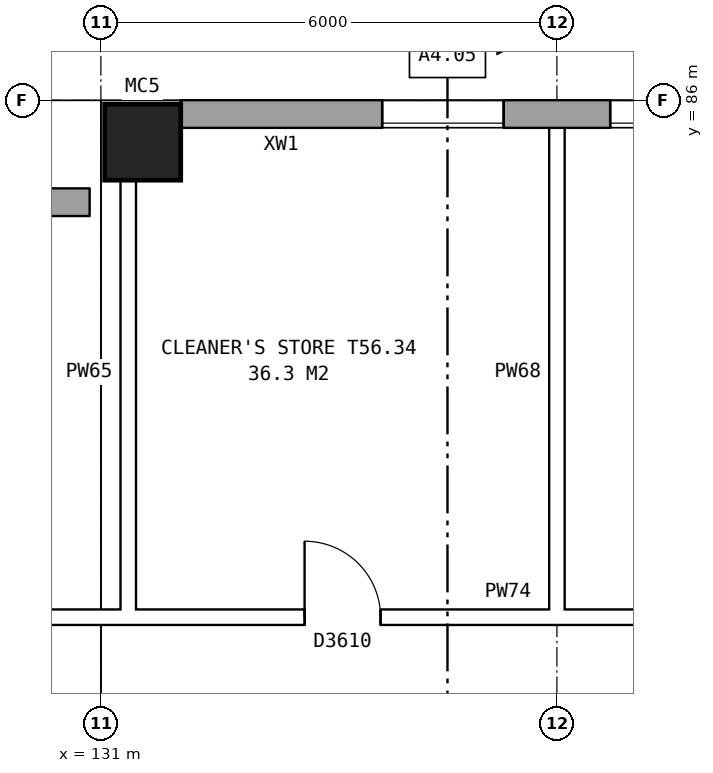
"""IFC4 building model, lengths in metres.
Left out: names, types, materials, properties, quantities, classifications, styles, units other than length and angle.
Written with IfcOpenShell. Run it as: python <this file> out.ifc"""

import sys

from ifc_helpers import new_model, si_unit, direction, frame, frame_2d, origin, origin_2d, place, context, subcontext, project, spatial, rectangle, hollow_rectangle, extrude, element, fill, save


model = new_model("IFC4")
c1 = context("Model", 3, precision=1e-05, world=origin(), true_north=direction((0.0, 1.0)))
c2 = subcontext(c1, "Body", "Model", "MODEL_VIEW")
j1 = project(units=[si_unit("LENGTHUNIT", "METRE"), si_unit("PLANEANGLEUNIT", "RADIAN")], contexts=[c1])
p1 = place(None, origin())
s1 = spatial("IfcSite", under=j1, at=p1, CompositionType="ELEMENT")
p2 = place(p1, origin())
s2 = spatial("IfcBuilding", under=s1, at=p2, CompositionType="ELEMENT")
p3 = place(p2, frame((0.0, 0.0, 198.6)))
s3 = spatial("IfcBuildingStorey", under=s2, at=p3, CompositionType="ELEMENT", Elevation=198.6)
p4 = place(p3, frame((131.55, 85.45, 0.0), z_axis=(0.0, 0.0, 1.0), x_axis=(1.0, 0.0, 0.0)))
e1 = element("IfcColumn", 1, at=p4, inside=s3, PredefinedType="COLUMN", context=c2, shape_type="SweptSolid", body=[
    extrude(hollow_rectangle(XDim=1.0, YDim=1.0, WallThickness=0.055, at=origin_2d()), origin(), (0.0, 0.0, 1.0), 4.2),
])
p5 = place(p3, frame((165.925, 85.82, 0.0), z_axis=(0.0, 0.0, 1.0), x_axis=(-1.0, 0.0, 0.0)))
e2 = element("IfcWall", 2, at=p5, inside=s3, PredefinedType="STANDARD", context=c2, shape_type="SweptSolid", body=[
    extrude(rectangle(XDim=33.875, YDim=0.36, at=frame_2d((16.938, 0.0))), origin(), (0.0, 0.0, 1.0), 3.7),
])
p6 = place(p5, frame((2.625, 0.0, 1.5)))
e3 = element("IfcOpeningElement", 3, at=p6, cuts=e2, PredefinedType="OPENING", context=c2, shape_type="SweptSolid", body=[
    extrude(rectangle(XDim=1.6, YDim=1.2, at=frame_2d((0.8, 0.6))), frame((0.0, 0.19, 0.0), z_axis=(0.0, -1.0, 0.0), x_axis=(1.0, 0.0, 0.0)), (0.0, 0.0, 1.0), 0.38),
])
p7 = place(p5, frame((5.625, 0.0, 1.5)))
e4 = element("IfcOpeningElement", 4, at=p7, cuts=e2, PredefinedType="OPENING", context=c2, shape_type="SweptSolid", body=[
    extrude(rectangle(XDim=1.6, YDim=1.2, at=frame_2d((0.8, 0.6))), frame((0.0, 0.19, 0.0), z_axis=(0.0, -1.0, 0.0), x_axis=(1.0, 0.0, 0.0)), (0.0, 0.0, 1.0), 0.38),
])
p8 = place(p5, frame((8.625, 0.0, 1.5)))
e5 = element("IfcOpeningElement", 5, at=p8, cuts=e2, PredefinedType="OPENING", context=c2, shape_type="SweptSolid", body=[
    extrude(rectangle(XDim=1.6, YDim=1.2, at=frame_2d((0.8, 0.6))), frame((0.0, 0.19, 0.0), z_axis=(0.0, -1.0, 0.0), x_axis=(1.0, 0.0, 0.0)), (0.0, 0.0, 1.0), 0.38),
])
p9 = place(p5, frame((11.625, 0.0, 1.5)))
e6 = element("IfcOpeningElement", 6, at=p9, cuts=e2, PredefinedType="OPENING", context=c2, shape_type="SweptSolid", body=[
    extrude(rectangle(XDim=1.6, YDim=1.2, at=frame_2d((0.8, 0.6))), frame((0.0, 0.19, 0.0), z_axis=(0.0, -1.0, 0.0), x_axis=(1.0, 0.0, 0.0)), (0.0, 0.0, 1.0), 0.38),
])
p10 = place(p5, frame((14.625, 0.0, 1.5)))
e7 = element("IfcOpeningElement", 7, at=p10, cuts=e2, PredefinedType="OPENING", context=c2, shape_type="SweptSolid", body=[
    extrude(rectangle(XDim=1.6, YDim=1.2, at=frame_2d((0.8, 0.6))), frame((0.0, 0.19, 0.0), z_axis=(0.0, -1.0, 0.0), x_axis=(1.0, 0.0, 0.0)), (0.0, 0.0, 1.0), 0.38),
])
p11 = place(p5, frame((17.625, 0.0, 1.5)))
e8 = element("IfcOpeningElement", 8, at=p11, cuts=e2, PredefinedType="OPENING", context=c2, shape_type="SweptSolid", body=[
    extrude(rectangle(XDim=1.6, YDim=1.2, at=frame_2d((0.8, 0.6))), frame((0.0, 0.19, 0.0), z_axis=(0.0, -1.0, 0.0), x_axis=(1.0, 0.0, 0.0)), (0.0, 0.0, 1.0), 0.38),
])
p12 = place(p5, frame((20.625, 0.0, 1.5)))
e9 = element("IfcOpeningElement", 9, at=p12, cuts=e2, PredefinedType="OPENING", context=c2, shape_type="SweptSolid", body=[
    extrude(rectangle(XDim=1.6, YDim=1.2, at=frame_2d((0.8, 0.6))), frame((0.0, 0.19, 0.0), z_axis=(0.0, -1.0, 0.0), x_axis=(1.0, 0.0, 0.0)), (0.0, 0.0, 1.0), 0.38),
])
p13 = place(p5, frame((23.625, 0.0, 1.5)))
e10 = element("IfcOpeningElement", 10, at=p13, cuts=e2, PredefinedType="OPENING", context=c2, shape_type="SweptSolid", body=[
    extrude(rectangle(XDim=1.6, YDim=1.2, at=frame_2d((0.8, 0.6))), frame((0.0, 0.19, 0.0), z_axis=(0.0, -1.0, 0.0), x_axis=(1.0, 0.0, 0.0)), (0.0, 0.0, 1.0), 0.38),
])
p14 = place(p5, frame((26.625, 0.0, 1.5)))
e11 = element("IfcOpeningElement", 11, at=p14, cuts=e2, PredefinedType="OPENING", context=c2, shape_type="SweptSolid", body=[
    extrude(rectangle(XDim=1.6, YDim=1.2, at=frame_2d((0.8, 0.6))), frame((0.0, 0.19, 0.0), z_axis=(0.0, -1.0, 0.0), x_axis=(1.0, 0.0, 0.0)), (0.0, 0.0, 1.0), 0.38),
])
p15 = place(p5, frame((29.625, 0.0, 1.5)))
e12 = element("IfcOpeningElement", 12, at=p15, cuts=e2, PredefinedType="OPENING", context=c2, shape_type="SweptSolid", body=[
    extrude(rectangle(XDim=1.6, YDim=1.2, at=frame_2d((0.8, 0.6))), frame((0.0, 0.19, 0.0), z_axis=(0.0, -1.0, 0.0), x_axis=(1.0, 0.0, 0.0)), (0.0, 0.0, 1.0), 0.38),
])
p16 = place(p3, frame((130.85, 84.66, 0.0), z_axis=(0.0, 0.0, 1.0), x_axis=(-1.0, 0.0, 0.0)))
e13 = element("IfcWall", 13, at=p16, inside=s3, PredefinedType="STANDARD", context=c2, shape_type="SweptSolid", body=[
    extrude(rectangle(XDim=54.7, YDim=0.36, at=frame_2d((27.35, 0.0))), origin(), (0.0, 0.0, 1.0), 3.7),
])
p17 = place(p16, frame((1.75, 0.0, 1.5)))
e14 = element("IfcOpeningElement", 14, at=p17, cuts=e13, PredefinedType="OPENING", context=c2, shape_type="SweptSolid", body=[
    extrude(rectangle(XDim=0.6, YDim=1.2, at=frame_2d((0.3, 0.6))), frame((0.0, 0.19, 0.0), z_axis=(0.0, -1.0, 0.0), x_axis=(1.0, 0.0, 0.0)), (0.0, 0.0, 1.0), 0.38),
])
p18 = place(p16, frame((4.206, 0.0, 1.5)))
e15 = element("IfcOpeningElement", 15, at=p18, cuts=e13, PredefinedType="OPENING", context=c2, shape_type="SweptSolid", body=[
    extrude(rectangle(XDim=1.6, YDim=1.2, at=frame_2d((0.8, 0.6))), frame((0.0, 0.19, 0.0), z_axis=(0.0, -1.0, 0.0), x_axis=(1.0, 0.0, 0.0)), (0.0, 0.0, 1.0), 0.38),
])
p19 = place(p16, frame((2.65, 0.0, 1.5)))
e16 = element("IfcOpeningElement", 16, at=p19, cuts=e13, PredefinedType="OPENING", context=c2, shape_type="SweptSolid", body=[
    extrude(rectangle(XDim=1.2, YDim=1.2, at=frame_2d((0.6, 0.6))), frame((0.0, 0.19, 0.0), z_axis=(0.0, -1.0, 0.0), x_axis=(1.0, 0.0, 0.0)), (0.0, 0.0, 1.0), 0.38),
])
p20 = place(p16, frame((11.081, 0.0, 1.5)))
e17 = element("IfcOpeningElement", 17, at=p20, cuts=e13, PredefinedType="OPENING", context=c2, shape_type="SweptSolid", body=[
    extrude(rectangle(XDim=1.6, YDim=1.2, at=frame_2d((0.8, 0.6))), frame((0.0, 0.19, 0.0), z_axis=(0.0, -1.0, 0.0), x_axis=(1.0, 0.0, 0.0)), (0.0, 0.0, 1.0), 0.38),
])
p21 = place(p16, frame((15.5, 0.0, 1.5)))
e18 = element("IfcOpeningElement", 18, at=p21, cuts=e13, PredefinedType="OPENING", context=c2, shape_type="SweptSolid", body=[
    extrude(rectangle(XDim=1.6, YDim=1.2, at=frame_2d((0.8, 0.6))), frame((0.0, 0.19, 0.0), z_axis=(0.0, -1.0, 0.0), x_axis=(1.0, 0.0, 0.0)), (0.0, 0.0, 1.0), 0.38),
])
p22 = place(p16, frame((17.956, 0.0, 1.5)))
e19 = element("IfcOpeningElement", 19, at=p22, cuts=e13, PredefinedType="OPENING", context=c2, shape_type="SweptSolid", body=[
    extrude(rectangle(XDim=1.6, YDim=1.2, at=frame_2d((0.8, 0.6))), frame((0.0, 0.19, 0.0), z_axis=(0.0, -1.0, 0.0), x_axis=(1.0, 0.0, 0.0)), (0.0, 0.0, 1.0), 0.38),
])
p23 = place(p16, frame((19.9, 0.0, 1.5)))
e20 = element("IfcOpeningElement", 20, at=p23, cuts=e13, PredefinedType="OPENING", context=c2, shape_type="SweptSolid", body=[
    extrude(rectangle(XDim=0.6, YDim=1.2, at=frame_2d((0.3, 0.6))), frame((0.0, 0.19, 0.0), z_axis=(0.0, -1.0, 0.0), x_axis=(1.0, 0.0, 0.0)), (0.0, 0.0, 1.0), 0.38),
])
p24 = place(p16, frame((24.831, 0.0, 1.5)))
e21 = element("IfcOpeningElement", 21, at=p24, cuts=e13, PredefinedType="OPENING", context=c2, shape_type="SweptSolid", body=[
    extrude(rectangle(XDim=1.6, YDim=1.2, at=frame_2d((0.8, 0.6))), frame((0.0, 0.19, 0.0), z_axis=(0.0, -1.0, 0.0), x_axis=(1.0, 0.0, 0.0)), (0.0, 0.0, 1.0), 0.38),
])
p25 = place(p16, frame((28.269, 0.0, 1.5)))
e22 = element("IfcOpeningElement", 22, at=p25, cuts=e13, PredefinedType="OPENING", context=c2, shape_type="SweptSolid", body=[
    extrude(rectangle(XDim=1.6, YDim=1.2, at=frame_2d((0.8, 0.6))), frame((0.0, 0.19, 0.0), z_axis=(0.0, -1.0, 0.0), x_axis=(1.0, 0.0, 0.0)), (0.0, 0.0, 1.0), 0.38),
])
p26 = place(p16, frame((22.35, 0.0, 1.5)))
e23 = element("IfcOpeningElement", 23, at=p26, cuts=e13, PredefinedType="OPENING", context=c2, shape_type="SweptSolid", body=[
    extrude(rectangle(XDim=1.6, YDim=1.2, at=frame_2d((0.8, 0.6))), frame((0.0, 0.19, 0.0), z_axis=(0.0, -1.0, 0.0), x_axis=(1.0, 0.0, 0.0)), (0.0, 0.0, 1.0), 0.38),
])
p27 = place(p16, frame((35.144, 0.0, 1.5)))
e24 = element("IfcOpeningElement", 24, at=p27, cuts=e13, PredefinedType="OPENING", context=c2, shape_type="SweptSolid", body=[
    extrude(rectangle(XDim=1.6, YDim=1.2, at=frame_2d((0.8, 0.6))), frame((0.0, 0.19, 0.0), z_axis=(0.0, -1.0, 0.0), x_axis=(1.0, 0.0, 0.0)), (0.0, 0.0, 1.0), 0.38),
])
p28 = place(p16, frame((37.075, 0.0, 1.5)))
e25 = element("IfcOpeningElement", 25, at=p28, cuts=e13, PredefinedType="OPENING", context=c2, shape_type="SweptSolid", body=[
    extrude(rectangle(XDim=0.6, YDim=1.2, at=frame_2d((0.3, 0.6))), frame((0.0, 0.19, 0.0), z_axis=(0.0, -1.0, 0.0), x_axis=(1.0, 0.0, 0.0)), (0.0, 0.0, 1.0), 0.38),
])
p29 = place(p16, frame((42.019, 0.0, 1.5)))
e26 = element("IfcOpeningElement", 26, at=p29, cuts=e13, PredefinedType="OPENING", context=c2, shape_type="SweptSolid", body=[
    extrude(rectangle(XDim=1.6, YDim=1.2, at=frame_2d((0.8, 0.6))), frame((0.0, 0.19, 0.0), z_axis=(0.0, -1.0, 0.0), x_axis=(1.0, 0.0, 0.0)), (0.0, 0.0, 1.0), 0.38),
])
p30 = place(p16, frame((37.975, 0.0, 1.5)))
e27 = element("IfcOpeningElement", 27, at=p30, cuts=e13, PredefinedType="OPENING", context=c2, shape_type="SweptSolid", body=[
    extrude(rectangle(XDim=1.2, YDim=1.2, at=frame_2d((0.6, 0.6))), frame((0.0, 0.19, 0.0), z_axis=(0.0, -1.0, 0.0), x_axis=(1.0, 0.0, 0.0)), (0.0, 0.0, 1.0), 0.38),
])
p31 = place(p16, frame((48.894, 0.0, 1.5)))
e28 = element("IfcOpeningElement", 28, at=p31, cuts=e13, PredefinedType="OPENING", context=c2, shape_type="SweptSolid", body=[
    extrude(rectangle(XDim=1.6, YDim=1.2, at=frame_2d((0.8, 0.6))), frame((0.0, 0.19, 0.0), z_axis=(0.0, -1.0, 0.0), x_axis=(1.0, 0.0, 0.0)), (0.0, 0.0, 1.0), 0.38),
])
p32 = place(p16, frame((41.075, 0.0, 1.5)))
e29 = element("IfcOpeningElement", 29, at=p32, cuts=e13, PredefinedType="OPENING", context=c2, shape_type="SweptSolid", body=[
    extrude(rectangle(XDim=0.6, YDim=1.2, at=frame_2d((0.3, 0.6))), frame((0.0, 0.19, 0.0), z_axis=(0.0, -1.0, 0.0), x_axis=(1.0, 0.0, 0.0)), (0.0, 0.0, 1.0), 0.38),
])
p33 = place(p16, frame((6.15, 0.0, 1.5)))
e30 = element("IfcOpeningElement", 30, at=p33, cuts=e13, PredefinedType="OPENING", context=c2, shape_type="SweptSolid", body=[
    extrude(rectangle(XDim=0.6, YDim=1.2, at=frame_2d((0.3, 0.6))), frame((0.0, 0.19, 0.0), z_axis=(0.0, -1.0, 0.0), x_axis=(1.0, 0.0, 0.0)), (0.0, 0.0, 1.0), 0.38),
])
p34 = place(p16, frame((8.6, 0.0, 1.5)))
e31 = element("IfcOpeningElement", 31, at=p34, cuts=e13, PredefinedType="OPENING", context=c2, shape_type="SweptSolid", body=[
    extrude(rectangle(XDim=1.6, YDim=1.2, at=frame_2d((0.8, 0.6))), frame((0.0, 0.19, 0.0), z_axis=(0.0, -1.0, 0.0), x_axis=(1.0, 0.0, 0.0)), (0.0, 0.0, 1.0), 0.38),
])
p35 = place(p16, frame((26.75, 0.0, 1.5)))
e32 = element("IfcOpeningElement", 32, at=p35, cuts=e13, PredefinedType="OPENING", context=c2, shape_type="SweptSolid", body=[
    extrude(rectangle(XDim=1.2, YDim=1.2, at=frame_2d((0.6, 0.6))), frame((0.0, 0.19, 0.0), z_axis=(0.0, -1.0, 0.0), x_axis=(1.0, 0.0, 0.0)), (0.0, 0.0, 1.0), 0.38),
])
p36 = place(p16, frame((30.2, 0.0, 1.5)))
e33 = element("IfcOpeningElement", 33, at=p36, cuts=e13, PredefinedType="OPENING", context=c2, shape_type="SweptSolid", body=[
    extrude(rectangle(XDim=1.2, YDim=1.2, at=frame_2d((0.6, 0.6))), frame((0.0, 0.19, 0.0), z_axis=(0.0, -1.0, 0.0), x_axis=(1.0, 0.0, 0.0)), (0.0, 0.0, 1.0), 0.38),
])
p37 = place(p16, frame((43.925, 0.0, 1.5)))
e34 = element("IfcOpeningElement", 34, at=p37, cuts=e13, PredefinedType="OPENING", context=c2, shape_type="SweptSolid", body=[
    extrude(rectangle(XDim=1.6, YDim=1.2, at=frame_2d((0.8, 0.6))), frame((0.0, 0.19, 0.0), z_axis=(0.0, -1.0, 0.0), x_axis=(1.0, 0.0, 0.0)), (0.0, 0.0, 1.0), 0.38),
])
p38 = place(p16, frame((47.925, 0.0, 1.5)))
e35 = element("IfcOpeningElement", 35, at=p38, cuts=e13, PredefinedType="OPENING", context=c2, shape_type="SweptSolid", body=[
    extrude(rectangle(XDim=0.6, YDim=1.2, at=frame_2d((0.3, 0.6))), frame((0.0, 0.19, 0.0), z_axis=(0.0, -1.0, 0.0), x_axis=(1.0, 0.0, 0.0)), (0.0, 0.0, 1.0), 0.38),
])
p39 = place(p16, frame((50.825, 0.0, 1.5)))
e36 = element("IfcOpeningElement", 36, at=p39, cuts=e13, PredefinedType="OPENING", context=c2, shape_type="SweptSolid", body=[
    extrude(rectangle(XDim=1.6, YDim=1.2, at=frame_2d((0.8, 0.6))), frame((0.0, 0.19, 0.0), z_axis=(0.0, -1.0, 0.0), x_axis=(1.0, 0.0, 0.0)), (0.0, 0.0, 1.0), 0.38),
])
p40 = place(p3, frame((32.24, 79.2, 0.0), z_axis=(0.0, 0.0, 1.0), x_axis=(1.0, 0.0, 0.0)))
e37 = element("IfcWall", 37, at=p40, inside=s3, PredefinedType="PARTITIONING", context=c2, shape_type="SweptSolid", body=[
    extrude(rectangle(XDim=99.22, YDim=0.2, at=frame_2d((49.61, 0.0))), origin(), (0.0, 0.0, 1.0), 3.7),
])
p41 = place(p40, frame((3.44, 0.0, 0.0)))
e38 = element("IfcOpeningElement", 38, at=p41, cuts=e37, PredefinedType="OPENING", context=c2, shape_type="SweptSolid", body=[
    extrude(rectangle(XDim=1.0, YDim=2.1, at=frame_2d((0.5, 1.05))), frame((0.0, 0.11, 0.0), z_axis=(0.0, -1.0, 0.0), x_axis=(1.0, 0.0, 0.0)), (0.0, 0.0, 1.0), 0.22),
])
p42 = place(p40, frame((11.76, 0.0, 0.0)))
e39 = element("IfcOpeningElement", 39, at=p42, cuts=e37, PredefinedType="OPENING", context=c2, shape_type="SweptSolid", body=[
    extrude(rectangle(XDim=1.0, YDim=2.1, at=frame_2d((0.5, 1.05))), frame((0.0, 0.11, 0.0), z_axis=(0.0, -1.0, 0.0), x_axis=(1.0, 0.0, 0.0)), (0.0, 0.0, 1.0), 0.22),
])
p43 = place(p40, frame((22.26, 0.0, 0.0)))
e40 = element("IfcOpeningElement", 40, at=p43, cuts=e37, PredefinedType="OPENING", context=c2, shape_type="SweptSolid", body=[
    extrude(rectangle(XDim=1.0, YDim=2.1, at=frame_2d((0.5, 1.05))), frame((0.0, 0.11, 0.0), z_axis=(0.0, -1.0, 0.0), x_axis=(1.0, 0.0, 0.0)), (0.0, 0.0, 1.0), 0.22),
])
p44 = place(p40, frame((35.58, 0.0, 0.0)))
e41 = element("IfcOpeningElement", 41, at=p44, cuts=e37, PredefinedType="OPENING", context=c2, shape_type="SweptSolid", body=[
    extrude(rectangle(XDim=1.0, YDim=2.1, at=frame_2d((0.5, 1.05))), frame((0.0, 0.11, 0.0), z_axis=(0.0, -1.0, 0.0), x_axis=(1.0, 0.0, 0.0)), (0.0, 0.0, 1.0), 0.22),
])
p45 = place(p40, frame((53.392, 0.0, 0.0)))
e42 = element("IfcOpeningElement", 42, at=p45, cuts=e37, PredefinedType="OPENING", context=c2, shape_type="SweptSolid", body=[
    extrude(rectangle(XDim=1.0, YDim=2.1, at=frame_2d((0.5, 1.05))), frame((0.0, 0.11, 0.0), z_axis=(0.0, -1.0, 0.0), x_axis=(1.0, 0.0, 0.0)), (0.0, 0.0, 1.0), 0.22),
])
p46 = place(p40, frame((74.198, 0.0, 0.0)))
e43 = element("IfcOpeningElement", 43, at=p46, cuts=e37, PredefinedType="OPENING", context=c2, shape_type="SweptSolid", body=[
    extrude(rectangle(XDim=1.0, YDim=2.1, at=frame_2d((0.5, 1.05))), frame((0.0, 0.11, 0.0), z_axis=(0.0, -1.0, 0.0), x_axis=(1.0, 0.0, 0.0)), (0.0, 0.0, 1.0), 0.22),
])
p47 = place(p40, frame((91.565, 0.0, 0.0)))
e44 = element("IfcOpeningElement", 44, at=p47, cuts=e37, PredefinedType="OPENING", context=c2, shape_type="SweptSolid", body=[
    extrude(rectangle(XDim=1.0, YDim=2.1, at=frame_2d((0.5, 1.05))), frame((0.0, 0.11, 0.0), z_axis=(0.0, -1.0, 0.0), x_axis=(1.0, 0.0, 0.0)), (0.0, 0.0, 1.0), 0.22),
])
p48 = place(p3, frame((136.9, 79.2, 0.0), z_axis=(0.0, 0.0, 1.0), x_axis=(1.0, 0.0, 0.0)))
e45 = element("IfcWall", 45, at=p48, inside=s3, PredefinedType="PARTITIONING", context=c2, shape_type="SweptSolid", body=[
    extrude(rectangle(XDim=31.86, YDim=0.2, at=frame_2d((15.93, 0.0))), origin(), (0.0, 0.0, 1.0), 3.7),
])
p49 = place(p48, frame((6.9, 0.0, 0.0)))
e46 = element("IfcOpeningElement", 46, at=p49, cuts=e45, PredefinedType="OPENING", context=c2, shape_type="SweptSolid", body=[
    extrude(rectangle(XDim=1.0, YDim=2.1, at=frame_2d((0.5, 1.05))), frame((0.0, 0.11, 0.0), z_axis=(0.0, -1.0, 0.0), x_axis=(1.0, 0.0, 0.0)), (0.0, 0.0, 1.0), 0.22),
])
p50 = place(p48, frame((21.42, 0.0, 0.0)))
e47 = element("IfcOpeningElement", 47, at=p50, cuts=e45, PredefinedType="OPENING", context=c2, shape_type="SweptSolid", body=[
    extrude(rectangle(XDim=1.0, YDim=2.1, at=frame_2d((0.5, 1.05))), frame((0.0, 0.11, 0.0), z_axis=(0.0, -1.0, 0.0), x_axis=(1.0, 0.0, 0.0)), (0.0, 0.0, 1.0), 0.22),
])
p51 = place(p3, frame((131.26, 79.2, 0.0), z_axis=(0.0, 0.0, 1.0), x_axis=(1.0, 0.0, 0.0)))
e48 = element("IfcWall", 48, at=p51, inside=s3, PredefinedType="PARTITIONING", context=c2, shape_type="SweptSolid", body=[
    extrude(rectangle(XDim=5.84, YDim=0.2, at=frame_2d((2.92, 0.0))), origin(), (0.0, 0.0, 1.0), 3.7),
])
p52 = place(p51, frame((2.42, 0.0, 0.0)))
e49 = element("IfcOpeningElement", 49, at=p52, cuts=e48, PredefinedType="OPENING", context=c2, shape_type="SweptSolid", body=[
    extrude(rectangle(XDim=1.0, YDim=2.1, at=frame_2d((0.5, 1.05))), frame((0.0, 0.11, 0.0), z_axis=(0.0, -1.0, 0.0), x_axis=(1.0, 0.0, 0.0)), (0.0, 0.0, 1.0), 0.22),
])
for number, where, z_axis, x_axis in (
    (50, (131.36, 79.1, 0.0), (0.0, 0.0, 1.0), (0.0, 1.0, 0.0)),
    (51, (137.0, 79.1, 0.0), (0.0, 0.0, 1.0), (0.0, 1.0, 0.0)),
):
    element("IfcWall", number, at=place(p3, frame(where, z_axis=z_axis, x_axis=x_axis)), inside=s3, PredefinedType="PARTITIONING", context=c2, shape_type="SweptSolid", body=[
        extrude(rectangle(XDim=6.66, YDim=0.2, at=frame_2d((3.33, 0.0))), origin(), (0.0, 0.0, 1.0), 3.7),
    ])
p53 = place(p14, origin())
e52 = element("IfcWindow", 52, at=p53, inside=s3, PartitioningType="DOUBLE_PANEL_HORIZONTAL", PredefinedType="WINDOW", context=c2, shape_type="SweptSolid", body=[
    extrude(rectangle(XDim=1.6, YDim=1.2, at=frame_2d((0.8, 0.6))), frame((0.0, 0.15, 0.0), z_axis=(0.0, -1.0, 0.0), x_axis=(1.0, 0.0, 0.0)), (0.0, 0.0, 1.0), 0.06),
])
fill(e11, e52)
p54 = place(p15, origin())
e53 = element("IfcWindow", 53, at=p54, inside=s3, PartitioningType="DOUBLE_PANEL_HORIZONTAL", PredefinedType="WINDOW", context=c2, shape_type="SweptSolid", body=[
    extrude(rectangle(XDim=1.6, YDim=1.2, at=frame_2d((0.8, 0.6))), frame((0.0, 0.15, 0.0), z_axis=(0.0, -1.0, 0.0), x_axis=(1.0, 0.0, 0.0)), (0.0, 0.0, 1.0), 0.06),
])
fill(e12, e53)
p55 = place(p52, origin())
e54 = element("IfcDoor", 54, at=p55, inside=s3, OperationType="SINGLE_SWING_LEFT", PredefinedType="DOOR", context=c2, shape_type="SweptSolid", body=[
    extrude(rectangle(XDim=1.0, YDim=2.1, at=frame_2d((0.5, 1.05))), frame((0.0, 0.025, 0.0), z_axis=(0.0, -1.0, 0.0), x_axis=(1.0, 0.0, 0.0)), (0.0, 0.0, 1.0), 0.05),
])
fill(e49, e54)
save(model, sys.argv[1])
